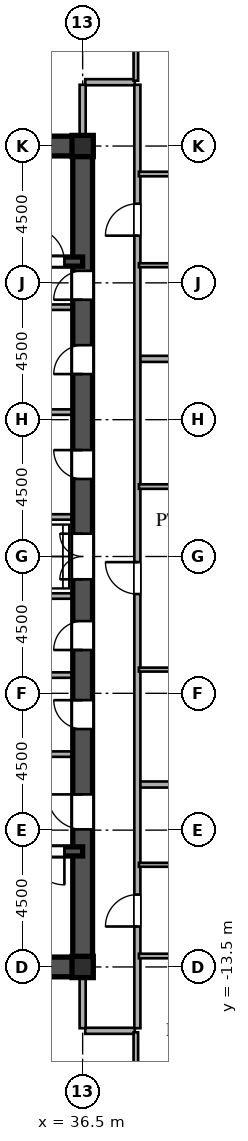
"""IFC4 building model, lengths in metres.
Left out: names, types, materials, properties, quantities, classifications, styles, units other than length and angle.
Written with IfcOpenShell. Run it as: python <this file> out.ifc"""

import sys

from ifc_helpers import new_model, si_unit, direction, frame, frame_2d, origin, origin_2d, place, context, subcontext, project, spatial, rectangle, i_section, extrude, source, transform, mapped, element, fill, save


model = new_model("IFC4")
c1 = context("Model", 3, precision=1e-05, world=origin(), true_north=direction((0.0, 1.0)))
c2 = subcontext(c1, "Body", "Model", "MODEL_VIEW")
j1 = project(units=[si_unit("LENGTHUNIT", "METRE"), si_unit("PLANEANGLEUNIT", "RADIAN")], contexts=[c1])
p1 = place(None, origin())
s1 = spatial("IfcSite", under=j1, at=p1, CompositionType="ELEMENT")
p2 = place(p1, origin())
s2 = spatial("IfcBuilding", under=s1, at=p2, CompositionType="ELEMENT")
p3 = place(p2, frame((0.0, 0.0, 114.0)))
s3 = spatial("IfcBuildingStorey", under=s2, at=p3, CompositionType="ELEMENT", Elevation=114.0)
m1 = source(origin(), c2, "Body", "SweptSolid", [
    extrude(i_section(OverallWidth=0.7, OverallDepth=0.7, WebThickness=0.028, FlangeThickness=0.045, at=origin_2d()), origin(), (0.0, 0.0, 1.0), 3.6),
])
for number, where, z_axis, x_axis in (
    (1, (36.5, -13.5, 0.0), (0.0, 0.0, 1.0), (1.0, 0.0, 0.0)),
    (2, (36.5, 13.5, 0.0), (0.0, 0.0, 1.0), (1.0, 0.0, 0.0)),
):
    element("IfcColumn", number, at=place(p3, frame(where, z_axis=z_axis, x_axis=x_axis)), inside=s3, PredefinedType="COLUMN", context=c2, shape_type="MappedRepresentation", body=[
        mapped(m1, transform((0.0, 0.0, 0.0), scale=1.0)),
    ])
for number, where, z_axis, x_axis in (
    (3, (27.5, -13.5, 0.0), (0.0, 0.0, 1.0), (1.0, 0.0, 0.0)),
    (4, (27.5, 13.5, 0.0), (0.0, 0.0, 1.0), (1.0, 0.0, 0.0)),
):
    element("IfcWall", number, at=place(p3, frame(where, z_axis=z_axis, x_axis=x_axis)), inside=s3, PredefinedType="SHEAR", context=c2, shape_type="SweptSolid", body=[
        extrude(rectangle(XDim=9.0, YDim=0.65, at=frame_2d((4.5, 0.0))), origin(), (0.0, 0.0, 1.0), 3.38),
    ])
p4 = place(p3, frame((36.5, -13.65, 0.0), z_axis=(0.0, 0.0, 1.0), x_axis=(0.0, 1.0, 0.0)))
e5 = element("IfcWall", 5, at=p4, inside=s3, PredefinedType="SHEAR", context=c2, shape_type="SweptSolid", body=[
    extrude(rectangle(XDim=7.15, YDim=0.65, at=frame_2d((3.575, 0.0))), origin(), (0.0, 0.0, 1.0), 3.38),
])
p5 = place(p4, frame((4.675, 0.0, 0.0)))
e6 = element("IfcOpeningElement", 6, at=p5, cuts=e5, PredefinedType="OPENING", context=c2, shape_type="SweptSolid", body=[
    extrude(rectangle(XDim=1.15, YDim=2.2, at=frame_2d((0.575, 1.1))), frame((0.0, 0.335, 0.0), z_axis=(0.0, -1.0, 0.0), x_axis=(1.0, 0.0, 0.0)), (0.0, 0.0, 1.0), 0.67),
])
p6 = place(p3, frame((36.5, -1.3, 0.0), z_axis=(0.0, 0.0, 1.0), x_axis=(0.0, 1.0, 0.0)))
e7 = element("IfcWall", 7, at=p6, inside=s3, PredefinedType="SHEAR", context=c2, shape_type="SweptSolid", body=[
    extrude(rectangle(XDim=2.6, YDim=0.65, at=frame_2d((1.3, 0.0))), origin(), (0.0, 0.0, 1.0), 3.38),
])
p7 = place(p6, frame((0.55, 0.0, 0.0)))
e8 = element("IfcOpeningElement", 8, at=p7, cuts=e7, PredefinedType="OPENING", context=c2, shape_type="SweptSolid", body=[
    extrude(rectangle(XDim=1.5, YDim=2.3, at=frame_2d((0.75, 1.15))), frame((0.0, 0.335, 0.0), z_axis=(0.0, -1.0, 0.0), x_axis=(1.0, 0.0, 0.0)), (0.0, 0.0, 1.0), 0.67),
])
p8 = place(p3, frame((36.5, 8.2, 0.0), z_axis=(0.0, 0.0, 1.0), x_axis=(0.0, 1.0, 0.0)))
e9 = element("IfcWall", 9, at=p8, inside=s3, PredefinedType="SHEAR", context=c2, shape_type="SweptSolid", body=[
    extrude(rectangle(XDim=5.45, YDim=0.65, at=frame_2d((2.725, 0.0))), origin(), (0.0, 0.0, 1.0), 3.38),
])
p9 = place(p8, frame((0.245, 0.0, 0.0)))
e10 = element("IfcOpeningElement", 10, at=p9, cuts=e9, PredefinedType="OPENING", context=c2, shape_type="SweptSolid", body=[
    extrude(rectangle(XDim=0.95, YDim=2.15, at=frame_2d((0.475, 1.075))), frame((0.0, 0.335, 0.0), z_axis=(0.0, -1.0, 0.0), x_axis=(1.0, 0.0, 0.0)), (0.0, 0.0, 1.0), 0.67),
])
p10 = place(p3, frame((36.5, -6.5, 0.0), z_axis=(0.0, 0.0, 1.0), x_axis=(0.0, 1.0, 0.0)))
e11 = element("IfcWall", 11, at=p10, inside=s3, PredefinedType="SHEAR", context=c2, shape_type="SweptSolid", body=[
    extrude(rectangle(XDim=2.6, YDim=0.65, at=frame_2d((1.3, 0.0))), origin(), (0.0, 0.0, 1.0), 3.38),
])
p11 = place(p10, frame((0.825, 0.0, 0.0)))
e12 = element("IfcOpeningElement", 12, at=p11, cuts=e11, PredefinedType="OPENING", context=c2, shape_type="SweptSolid", body=[
    extrude(rectangle(XDim=0.95, YDim=2.15, at=frame_2d((0.475, 1.075))), frame((0.0, 0.335, 0.0), z_axis=(0.0, -1.0, 0.0), x_axis=(1.0, 0.0, 0.0)), (0.0, 0.0, 1.0), 0.67),
])
p12 = place(p3, frame((36.5, -3.9, 0.0), z_axis=(0.0, 0.0, 1.0), x_axis=(0.0, 1.0, 0.0)))
e13 = element("IfcWall", 13, at=p12, inside=s3, PredefinedType="SHEAR", context=c2, shape_type="SweptSolid", body=[
    extrude(rectangle(XDim=2.6, YDim=0.65, at=frame_2d((1.3, 0.0))), origin(), (0.0, 0.0, 1.0), 3.38),
])
p13 = place(p12, frame((0.825, 0.0, 0.0)))
e14 = element("IfcOpeningElement", 14, at=p13, cuts=e13, PredefinedType="OPENING", context=c2, shape_type="SweptSolid", body=[
    extrude(rectangle(XDim=0.95, YDim=2.15, at=frame_2d((0.475, 1.075))), frame((0.0, 0.335, 0.0), z_axis=(0.0, -1.0, 0.0), x_axis=(1.0, 0.0, 0.0)), (0.0, 0.0, 1.0), 0.67),
])
p14 = place(p3, frame((36.5, 1.3, 0.0), z_axis=(0.0, 0.0, 1.0), x_axis=(0.0, 1.0, 0.0)))
e15 = element("IfcWall", 15, at=p14, inside=s3, PredefinedType="SHEAR", context=c2, shape_type="SweptSolid", body=[
    extrude(rectangle(XDim=3.45, YDim=0.65, at=frame_2d((1.725, 0.0))), origin(), (0.0, 0.0, 1.0), 3.38),
])
p15 = place(p14, frame((1.25, 0.0, 0.0)))
e16 = element("IfcOpeningElement", 16, at=p15, cuts=e15, PredefinedType="OPENING", context=c2, shape_type="SweptSolid", body=[
    extrude(rectangle(XDim=0.95, YDim=2.15, at=frame_2d((0.475, 1.075))), frame((0.0, 0.335, 0.0), z_axis=(0.0, -1.0, 0.0), x_axis=(1.0, 0.0, 0.0)), (0.0, 0.0, 1.0), 0.67),
])
p16 = place(p3, frame((36.5, 4.75, 0.0), z_axis=(0.0, 0.0, 1.0), x_axis=(0.0, 1.0, 0.0)))
e17 = element("IfcWall", 17, at=p16, inside=s3, PredefinedType="SHEAR", context=c2, shape_type="SweptSolid", body=[
    extrude(rectangle(XDim=3.45, YDim=0.65, at=frame_2d((1.725, 0.0))), origin(), (0.0, 0.0, 1.0), 3.38),
])
p17 = place(p16, frame((1.25, 0.0, 0.0)))
e18 = element("IfcOpeningElement", 18, at=p17, cuts=e17, PredefinedType="OPENING", context=c2, shape_type="SweptSolid", body=[
    extrude(rectangle(XDim=0.95, YDim=2.15, at=frame_2d((0.475, 1.075))), frame((0.0, 0.335, 0.0), z_axis=(0.0, -1.0, 0.0), x_axis=(1.0, 0.0, 0.0)), (0.0, 0.0, 1.0), 0.67),
])
p18 = place(p3, frame((27.5, -9.7, 0.0), z_axis=(0.0, 0.0, 1.0), x_axis=(1.0, 0.0, 0.0)))
e19 = element("IfcWall", 19, at=p18, inside=s3, PredefinedType="SHEAR", context=c2, shape_type="SweptSolid", body=[
    extrude(rectangle(XDim=9.0, YDim=0.3, at=frame_2d((4.5, 0.0))), origin(), (0.0, 0.0, 1.0), 3.38),
])
p19 = place(p18, frame((7.3, 0.0, 0.0)))
e20 = element("IfcOpeningElement", 20, at=p19, cuts=e19, PredefinedType="OPENING", context=c2, shape_type="SweptSolid", body=[
    extrude(rectangle(XDim=1.1, YDim=2.2, at=frame_2d((0.55, 1.1))), frame((0.0, 0.16, 0.0), z_axis=(0.0, -1.0, 0.0), x_axis=(1.0, 0.0, 0.0)), (0.0, 0.0, 1.0), 0.32),
])
p20 = place(p3, frame((27.5, 9.7, 0.0), z_axis=(0.0, 0.0, 1.0), x_axis=(1.0, 0.0, 0.0)))
e21 = element("IfcWall", 21, at=p20, inside=s3, PredefinedType="SHEAR", context=c2, shape_type="SweptSolid", body=[
    extrude(rectangle(XDim=9.0, YDim=0.3, at=frame_2d((4.5, 0.0))), origin(), (0.0, 0.0, 1.0), 3.38),
])
p21 = place(p20, frame((7.3, 0.0, 0.0)))
e22 = element("IfcOpeningElement", 22, at=p21, cuts=e21, PredefinedType="OPENING", context=c2, shape_type="SweptSolid", body=[
    extrude(rectangle(XDim=1.1, YDim=2.2, at=frame_2d((0.55, 1.1))), frame((0.0, 0.16, 0.0), z_axis=(0.0, -1.0, 0.0), x_axis=(1.0, 0.0, 0.0)), (0.0, 0.0, 1.0), 0.32),
])
for number, where, z_axis, x_axis in (
    (23, (30.45, -6.5, 0.0), (0.0, 0.0, 1.0), (1.0, 0.0, 0.0)),
    (24, (30.45, 8.2, 0.0), (0.0, 0.0, 1.0), (1.0, 0.0, 0.0)),
):
    element("IfcWall", number, at=place(p3, frame(where, z_axis=z_axis, x_axis=x_axis)), inside=s3, PredefinedType="PARTITIONING", context=c2, shape_type="SweptSolid", body=[
        extrude(rectangle(XDim=5.7, YDim=0.18, at=frame_2d((2.85, 0.0))), origin(), (0.0, 0.0, 1.0), 3.38),
    ])
for number, where, z_axis, x_axis in (
    (25, (33.2, -1.3, 0.0), (0.0, 0.0, 1.0), (1.0, 0.0, 0.0)),
    (26, (33.2, 1.3, 0.0), (0.0, 0.0, 1.0), (1.0, 0.0, 0.0)),
    (27, (33.2, -3.9, 0.0), (0.0, 0.0, 1.0), (1.0, 0.0, 0.0)),
    (28, (33.2, 4.75, 0.0), (0.0, 0.0, 1.0), (1.0, 0.0, 0.0)),
):
    element("IfcWall", number, at=place(p3, frame(where, z_axis=z_axis, x_axis=x_axis)), inside=s3, PredefinedType="PARTITIONING", context=c2, shape_type="SweptSolid", body=[
        extrude(rectangle(XDim=2.95, YDim=0.18, at=frame_2d((1.475, 0.0))), origin(), (0.0, 0.0, 1.0), 3.38),
    ])
p22 = place(p3, frame((36.585, -15.6, 0.0), z_axis=(0.0, 0.0, 1.0), x_axis=(1.0, 0.0, 0.0)))
e29 = element("IfcWall", 29, at=p22, inside=s3, PredefinedType="PARTITIONING", context=c2, shape_type="SweptSolid", body=[
    extrude(rectangle(XDim=1.63, YDim=0.2, at=frame_2d((0.815, 0.0))), origin(), (0.0, 0.0, 1.0), 3.38),
])
p23 = place(p3, frame((38.35, -13.14, 0.0), z_axis=(0.0, 0.0, 1.0), x_axis=(1.0, 0.0, 0.0)))
e30 = element("IfcWall", 30, at=p23, inside=s3, PredefinedType="PARTITIONING", context=c2, shape_type="SweptSolid", body=[
    extrude(rectangle(XDim=5.7, YDim=0.15, at=frame_2d((2.85, 0.0))), origin(), (0.0, 0.0, 1.0), 3.38),
])
p24 = place(p23, frame((2.375, 0.0, 0.0)))
e31 = element("IfcOpeningElement", 31, at=p24, cuts=e30, PredefinedType="OPENING", context=c2, shape_type="SweptSolid", body=[
    extrude(rectangle(XDim=0.95, YDim=2.15, at=frame_2d((0.475, 1.075))), frame((0.0, 0.085, 0.0), z_axis=(0.0, -1.0, 0.0), x_axis=(1.0, 0.0, 0.0)), (0.0, 0.0, 1.0), 0.17),
])
p25 = place(p3, frame((38.35, -10.14, 0.0), z_axis=(0.0, 0.0, 1.0), x_axis=(1.0, 0.0, 0.0)))
e32 = element("IfcWall", 32, at=p25, inside=s3, PredefinedType="PARTITIONING", context=c2, shape_type="SweptSolid", body=[
    extrude(rectangle(XDim=5.7, YDim=0.13, at=frame_2d((2.85, 0.0))), origin(), (0.0, 0.0, 1.0), 3.38),
])
p26 = place(p25, frame((2.41, 0.0, 0.0)))
e33 = element("IfcOpeningElement", 33, at=p26, cuts=e32, PredefinedType="OPENING", context=c2, shape_type="SweptSolid", body=[
    extrude(rectangle(XDim=0.88, YDim=2.1, at=frame_2d((0.44, 1.05))), frame((0.0, 0.075, 0.0), z_axis=(0.0, -1.0, 0.0), x_axis=(1.0, 0.0, 0.0)), (0.0, 0.0, 1.0), 0.15),
])
p27 = place(p3, frame((38.38, -7.5, 0.0), z_axis=(0.0, 0.0, 1.0), x_axis=(1.0, 0.0, 0.0)))
e34 = element("IfcWall", 34, at=p27, inside=s3, PredefinedType="PARTITIONING", context=c2, shape_type="SweptSolid", body=[
    extrude(rectangle(XDim=26.259, YDim=0.2, at=frame_2d((13.129, 0.0))), origin(), (0.0, 0.0, 1.0), 3.38),
])
p28 = place(p3, frame((38.35, -3.72, 0.0), z_axis=(0.0, 0.0, 1.0), x_axis=(1.0, 0.0, 0.0)))
e35 = element("IfcWall", 35, at=p28, inside=s3, PredefinedType="PARTITIONING", context=c2, shape_type="SweptSolid", body=[
    extrude(rectangle(XDim=5.7, YDim=0.13, at=frame_2d((2.85, 0.0))), origin(), (0.0, 0.0, 1.0), 3.38),
])
p29 = place(p28, frame((2.41, 0.0, 0.0)))
e36 = element("IfcOpeningElement", 36, at=p29, cuts=e35, PredefinedType="OPENING", context=c2, shape_type="SweptSolid", body=[
    extrude(rectangle(XDim=0.88, YDim=2.1, at=frame_2d((0.44, 1.05))), frame((0.0, 0.075, 0.0), z_axis=(0.0, -1.0, 0.0), x_axis=(1.0, 0.0, 0.0)), (0.0, 0.0, 1.0), 0.15),
])
p30 = place(p3, frame((38.35, 2.3, 0.0), z_axis=(0.0, 0.0, 1.0), x_axis=(1.0, 0.0, 0.0)))
e37 = element("IfcWall", 37, at=p30, inside=s3, PredefinedType="PARTITIONING", context=c2, shape_type="SweptSolid", body=[
    extrude(rectangle(XDim=5.7, YDim=0.15, at=frame_2d((2.85, 0.0))), origin(), (0.0, 0.0, 1.0), 3.38),
])
p31 = place(p30, frame((2.375, 0.0, 0.0)))
e38 = element("IfcOpeningElement", 38, at=p31, cuts=e37, PredefinedType="OPENING", context=c2, shape_type="SweptSolid", body=[
    extrude(rectangle(XDim=0.95, YDim=2.15, at=frame_2d((0.475, 1.075))), frame((0.0, 0.085, 0.0), z_axis=(0.0, -1.0, 0.0), x_axis=(1.0, 0.0, 0.0)), (0.0, 0.0, 1.0), 0.17),
])
p32 = place(p3, frame((38.38, 6.5, 0.0), z_axis=(0.0, 0.0, 1.0), x_axis=(1.0, 0.0, 0.0)))
e39 = element("IfcWall", 39, at=p32, inside=s3, PredefinedType="PARTITIONING", context=c2, shape_type="SweptSolid", body=[
    extrude(rectangle(XDim=28.208, YDim=0.2, at=frame_2d((14.104, 0.0))), origin(), (0.0, 0.0, 1.0), 3.38),
])
p33 = place(p3, frame((38.35, 9.58, 0.0), z_axis=(0.0, 0.0, 1.0), x_axis=(1.0, 0.0, 0.0)))
e40 = element("IfcWall", 40, at=p33, inside=s3, PredefinedType="PARTITIONING", context=c2, shape_type="SweptSolid", body=[
    extrude(rectangle(XDim=5.7, YDim=0.13, at=frame_2d((2.85, 0.0))), origin(), (0.0, 0.0, 1.0), 3.38),
])
p34 = place(p33, frame((2.41, 0.0, 0.0)))
e41 = element("IfcOpeningElement", 41, at=p34, cuts=e40, PredefinedType="OPENING", context=c2, shape_type="SweptSolid", body=[
    extrude(rectangle(XDim=0.88, YDim=2.1, at=frame_2d((0.44, 1.05))), frame((0.0, 0.075, 0.0), z_axis=(0.0, -1.0, 0.0), x_axis=(1.0, 0.0, 0.0)), (0.0, 0.0, 1.0), 0.15),
])
p35 = place(p3, frame((38.35, 12.58, 0.0), z_axis=(0.0, 0.0, 1.0), x_axis=(1.0, 0.0, 0.0)))
e42 = element("IfcWall", 42, at=p35, inside=s3, PredefinedType="PARTITIONING", context=c2, shape_type="SweptSolid", body=[
    extrude(rectangle(XDim=5.7, YDim=0.15, at=frame_2d((2.85, 0.0))), origin(), (0.0, 0.0, 1.0), 3.38),
])
p36 = place(p35, frame((2.375, 0.0, 0.0)))
e43 = element("IfcOpeningElement", 43, at=p36, cuts=e42, PredefinedType="OPENING", context=c2, shape_type="SweptSolid", body=[
    extrude(rectangle(XDim=0.95, YDim=2.15, at=frame_2d((0.475, 1.075))), frame((0.0, 0.085, 0.0), z_axis=(0.0, -1.0, 0.0), x_axis=(1.0, 0.0, 0.0)), (0.0, 0.0, 1.0), 0.17),
])
p37 = place(p3, frame((36.585, 15.6, 0.0), z_axis=(0.0, 0.0, 1.0), x_axis=(1.0, 0.0, 0.0)))
e44 = element("IfcWall", 44, at=p37, inside=s3, PredefinedType="PARTITIONING", context=c2, shape_type="SweptSolid", body=[
    extrude(rectangle(XDim=1.63, YDim=0.2, at=frame_2d((0.815, 0.0))), origin(), (0.0, 0.0, 1.0), 3.38),
])
for number, where, z_axis, x_axis in (
    (45, (36.5, -15.515, 0.0), (0.0, 0.0, 1.0), (0.0, 1.0, 0.0)),
    (46, (36.5, 13.83, 0.0), (0.0, 0.0, 1.0), (0.0, 1.0, 0.0)),
):
    element("IfcWall", number, at=place(p3, frame(where, z_axis=z_axis, x_axis=x_axis)), inside=s3, PredefinedType="PARTITIONING", context=c2, shape_type="SweptSolid", body=[
        extrude(rectangle(XDim=1.685, YDim=0.2, at=frame_2d((0.842, 0.0))), origin(), (0.0, 0.0, 1.0), 2.78),
    ])
p38 = place(p3, frame((38.25, -21.071, 0.0), z_axis=(0.0, 0.0, 1.0), x_axis=(0.0, 1.0, 0.0)))
e47 = element("IfcWall", 47, at=p38, inside=s3, PredefinedType="PARTITIONING", context=c2, shape_type="SweptSolid", body=[
    extrude(rectangle(XDim=5.421, YDim=0.15, at=frame_2d((2.71, 0.0))), origin(), (0.0, 0.0, 1.0), 3.38),
])
p39 = place(p38, frame((0.578, 0.0, 0.0)))
e48 = element("IfcOpeningElement", 48, at=p39, cuts=e47, PredefinedType="OPENING", context=c2, shape_type="SweptSolid", body=[
    extrude(rectangle(XDim=0.95, YDim=2.15, at=frame_2d((0.475, 1.075))), frame((0.0, 0.085, 0.0), z_axis=(0.0, -1.0, 0.0), x_axis=(1.0, 0.0, 0.0)), (0.0, 0.0, 1.0), 0.17),
])
p40 = place(p3, frame((38.25, 15.65, 0.0), z_axis=(0.0, 0.0, 1.0), x_axis=(0.0, 1.0, 0.0)))
e49 = element("IfcWall", 49, at=p40, inside=s3, PredefinedType="PARTITIONING", context=c2, shape_type="SweptSolid", body=[
    extrude(rectangle(XDim=5.421, YDim=0.15, at=frame_2d((2.71, 0.0))), origin(), (0.0, 0.0, 1.0), 3.38),
])
p41 = place(p40, frame((1.175, 0.0, 0.0)))
e50 = element("IfcOpeningElement", 50, at=p41, cuts=e49, PredefinedType="OPENING", context=c2, shape_type="SweptSolid", body=[
    extrude(rectangle(XDim=0.95, YDim=2.15, at=frame_2d((0.475, 1.075))), frame((0.0, 0.085, 0.0), z_axis=(0.0, -1.0, 0.0), x_axis=(1.0, 0.0, 0.0)), (0.0, 0.0, 1.0), 0.17),
])
p42 = place(p3, frame((38.3, -15.515, 0.0), z_axis=(0.0, 0.0, 1.0), x_axis=(0.0, 1.0, 0.0)))
e51 = element("IfcWall", 51, at=p42, inside=s3, PredefinedType="PARTITIONING", context=c2, shape_type="SweptSolid", body=[
    extrude(rectangle(XDim=31.03, YDim=0.2, at=frame_2d((15.515, 0.0))), origin(), (0.0, 0.0, 1.0), 3.38),
])
p43 = place(p42, frame((3.345, 0.0, 0.0)))
e52 = element("IfcOpeningElement", 52, at=p43, cuts=e51, PredefinedType="OPENING", context=c2, shape_type="SweptSolid", body=[
    extrude(rectangle(XDim=1.05, YDim=2.25, at=frame_2d((0.525, 1.125))), frame((0.0, 0.11, 0.0), z_axis=(0.0, -1.0, 0.0), x_axis=(1.0, 0.0, 0.0)), (0.0, 0.0, 1.0), 0.22),
])
p44 = place(p42, frame((14.28, 0.0, 0.0)))
e53 = element("IfcOpeningElement", 53, at=p44, cuts=e51, PredefinedType="OPENING", context=c2, shape_type="SweptSolid", body=[
    extrude(rectangle(XDim=1.05, YDim=2.25, at=frame_2d((0.525, 1.125))), frame((0.0, 0.11, 0.0), z_axis=(0.0, -1.0, 0.0), x_axis=(1.0, 0.0, 0.0)), (0.0, 0.0, 1.0), 0.22),
])
p45 = place(p42, frame((26.067, 0.0, 0.0)))
e54 = element("IfcOpeningElement", 54, at=p45, cuts=e51, PredefinedType="OPENING", context=c2, shape_type="SweptSolid", body=[
    extrude(rectangle(XDim=1.05, YDim=2.25, at=frame_2d((0.525, 1.125))), frame((0.0, 0.11, 0.0), z_axis=(0.0, -1.0, 0.0), x_axis=(1.0, 0.0, 0.0)), (0.0, 0.0, 1.0), 0.22),
])
m2 = source(origin(), c2, "Body", "SweptSolid", [
    extrude(rectangle(XDim=1.15, YDim=2.2, at=frame_2d((0.575, 1.1))), frame((0.0, 0.025, 0.0), z_axis=(0.0, -1.0, 0.0), x_axis=(1.0, 0.0, 0.0)), (0.0, 0.0, 1.0), 0.05),
])
p46 = place(p5, origin())
e55 = element("IfcDoor", 55, at=p46, inside=s3, OperationType="SINGLE_SWING_RIGHT", PredefinedType="DOOR", context=c2, shape_type="MappedRepresentation", body=[
    mapped(m2, transform((0.0, 0.0, 0.0), scale=1.0)),
])
fill(e6, e55)
m3 = source(origin(), c2, "Body", "SweptSolid", [
    extrude(rectangle(XDim=1.5, YDim=2.3, at=frame_2d((0.75, 1.15))), frame((0.0, 0.025, 0.0), z_axis=(0.0, -1.0, 0.0), x_axis=(1.0, 0.0, 0.0)), (0.0, 0.0, 1.0), 0.05),
])
p47 = place(p7, origin())
e56 = element("IfcDoor", 56, at=p47, inside=s3, OperationType="DOUBLE_SWING_LEFT", PredefinedType="DOOR", context=c2, shape_type="MappedRepresentation", body=[
    mapped(m3, transform((0.0, 0.0, 0.0), scale=1.0)),
])
fill(e8, e56)
m4 = source(origin(), c2, "Body", "SweptSolid", [
    extrude(rectangle(XDim=0.95, YDim=2.15, at=frame_2d((0.475, 1.075))), frame((0.0, 0.025, 0.0), z_axis=(0.0, -1.0, 0.0), x_axis=(1.0, 0.0, 0.0)), (0.0, 0.0, 1.0), 0.05),
])
p48 = place(p9, origin())
e57 = element("IfcDoor", 57, at=p48, inside=s3, OperationType="SINGLE_SWING_LEFT", PredefinedType="DOOR", context=c2, shape_type="MappedRepresentation", body=[
    mapped(m4, transform((0.0, 0.0, 0.0), scale=1.0)),
])
fill(e10, e57)
p49 = place(p11, origin())
e58 = element("IfcDoor", 58, at=p49, inside=s3, OperationType="SINGLE_SWING_RIGHT", PredefinedType="DOOR", context=c2, shape_type="MappedRepresentation", body=[
    mapped(m4, transform((0.0, 0.0, 0.0), scale=1.0)),
])
fill(e12, e58)
p50 = place(p13, origin())
e59 = element("IfcDoor", 59, at=p50, inside=s3, OperationType="SINGLE_SWING_LEFT", PredefinedType="DOOR", context=c2, shape_type="MappedRepresentation", body=[
    mapped(m4, transform((0.0, 0.0, 0.0), scale=1.0)),
])
fill(e14, e59)
p51 = place(p15, origin())
e60 = element("IfcDoor", 60, at=p51, inside=s3, OperationType="SINGLE_SWING_RIGHT", PredefinedType="DOOR", context=c2, shape_type="MappedRepresentation", body=[
    mapped(m4, transform((0.0, 0.0, 0.0), scale=1.0)),
])
fill(e16, e60)
p52 = place(p17, origin())
e61 = element("IfcDoor", 61, at=p52, inside=s3, OperationType="SINGLE_SWING_LEFT", PredefinedType="DOOR", context=c2, shape_type="MappedRepresentation", body=[
    mapped(m4, transform((0.0, 0.0, 0.0), scale=1.0)),
])
fill(e18, e61)
m5 = source(origin(), c2, "Body", "SweptSolid", [
    extrude(rectangle(XDim=1.1, YDim=2.2, at=frame_2d((0.55, 1.1))), frame((0.0, 0.025, 0.0), z_axis=(0.0, -1.0, 0.0), x_axis=(1.0, 0.0, 0.0)), (0.0, 0.0, 1.0), 0.05),
])
p53 = place(p19, frame((1.1, 0.0, 0.0), z_axis=(0.0, 0.0, 1.0), x_axis=(-1.0, 0.0, 0.0)))
e62 = element("IfcDoor", 62, at=p53, inside=s3, OperationType="SINGLE_SWING_RIGHT", PredefinedType="DOOR", context=c2, shape_type="MappedRepresentation", body=[
    mapped(m5, transform((0.0, 0.0, 0.0), scale=1.0)),
])
fill(e20, e62)
p54 = place(p21, origin())
e63 = element("IfcDoor", 63, at=p54, inside=s3, OperationType="SINGLE_SWING_LEFT", PredefinedType="DOOR", context=c2, shape_type="MappedRepresentation", body=[
    mapped(m5, transform((0.0, 0.0, 0.0), scale=1.0)),
])
fill(e22, e63)
m6 = source(origin(), c2, "Body", "SweptSolid", [
    extrude(rectangle(XDim=1.05, YDim=2.25, at=frame_2d((0.525, 1.125))), frame((0.0, 0.025, 0.0), z_axis=(0.0, -1.0, 0.0), x_axis=(1.0, 0.0, 0.0)), (0.0, 0.0, 1.0), 0.05),
])
p55 = place(p43, origin())
e64 = element("IfcDoor", 64, at=p55, inside=s3, OperationType="SINGLE_SWING_LEFT", PredefinedType="DOOR", context=c2, shape_type="MappedRepresentation", body=[
    mapped(m6, transform((0.0, 0.0, 0.0), scale=1.0)),
])
fill(e52, e64)
p56 = place(p44, origin())
e65 = element("IfcDoor", 65, at=p56, inside=s3, OperationType="SINGLE_SWING_RIGHT", PredefinedType="DOOR", context=c2, shape_type="MappedRepresentation", body=[
    mapped(m6, transform((0.0, 0.0, 0.0), scale=1.0)),
])
fill(e53, e65)
p57 = place(p45, origin())
e66 = element("IfcDoor", 66, at=p57, inside=s3, OperationType="SINGLE_SWING_LEFT", PredefinedType="DOOR", context=c2, shape_type="MappedRepresentation", body=[
    mapped(m6, transform((0.0, 0.0, 0.0), scale=1.0)),
])
fill(e54, e66)
save(model, sys.argv[1])
